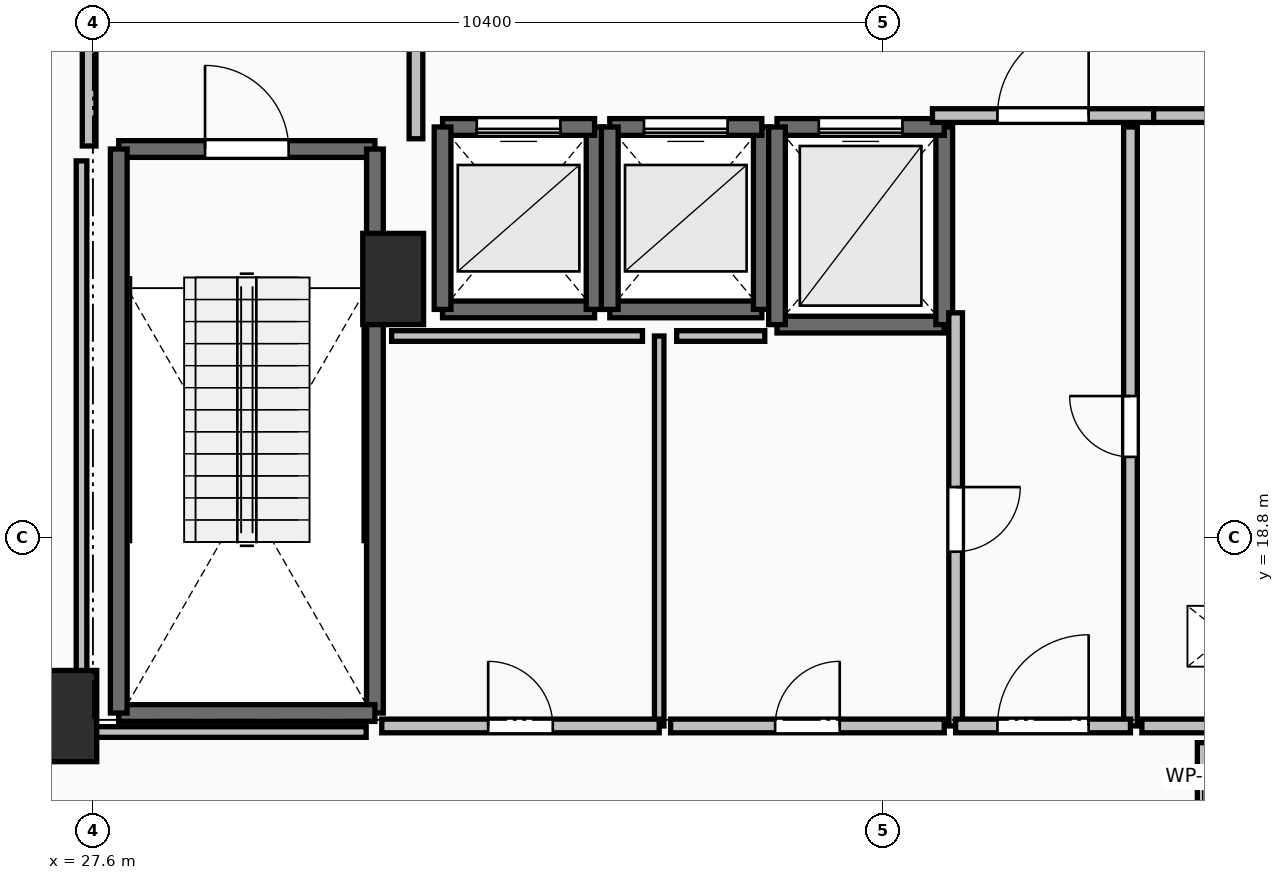
"""IFC4 building model, lengths in metres.
Left out: names, types, materials, properties, quantities, classifications, styles, units other than length and angle.
Written with IfcOpenShell. Run it as: python <this file> out.ifc"""

import sys

from ifc_helpers import new_model, si_unit, direction, frame, frame_2d, origin, origin_2d, place, context, subcontext, project, spatial, rectangle, extrude, element, fill, save


model = new_model("IFC4")
c1 = context("Model", 3, precision=1e-05, world=origin(), true_north=direction((0.0, 1.0)))
c2 = subcontext(c1, "Body", "Model", "MODEL_VIEW")
j1 = project(units=[si_unit("LENGTHUNIT", "METRE"), si_unit("PLANEANGLEUNIT", "RADIAN")], contexts=[c1])
p1 = place(None, origin())
s1 = spatial("IfcSite", under=j1, at=p1, CompositionType="ELEMENT")
p2 = place(p1, origin())
s2 = spatial("IfcBuilding", under=s1, at=p2, CompositionType="ELEMENT")
p3 = place(p2, frame((0.0, 0.0, 174.6)))
s3 = spatial("IfcBuildingStorey", under=s2, at=p3, CompositionType="ELEMENT", Elevation=174.6)
for number, where, z_axis, x_axis in (
    (1, (27.25, 16.45, 0.0), (0.0, 0.0, 1.0), (1.0, 0.0, 0.0)),
    (2, (31.55, 22.2, 0.0), (0.0, 0.0, 1.0), (1.0, 0.0, 0.0)),
):
    element("IfcColumn", number, at=place(p3, frame(where, z_axis=z_axis, x_axis=x_axis)), inside=s3, PredefinedType="PILASTER", context=c2, shape_type="SweptSolid", body=[
        extrude(rectangle(XDim=0.8, YDim=1.2, at=origin_2d()), origin(), (0.0, 0.0, 1.0), 4.5),
    ])
p4 = place(p3, frame((27.94, 23.91, 0.0), z_axis=(0.0, 0.0, 1.0), x_axis=(1.0, 0.0, 0.0)))
e3 = element("IfcWall", 3, at=p4, inside=s3, PredefinedType="SOLIDWALL", context=c2, shape_type="SweptSolid", body=[
    extrude(rectangle(XDim=3.37, YDim=0.22, at=frame_2d((1.685, 0.0))), origin(), (0.0, 0.0, 1.0), 4.24),
])
p5 = place(p4, frame((1.135, 0.0, 0.0)))
e4 = element("IfcOpeningElement", 4, at=p5, cuts=e3, PredefinedType="OPENING", context=c2, shape_type="SweptSolid", body=[
    extrude(rectangle(XDim=1.1, YDim=2.15, at=frame_2d((0.55, 1.075))), frame((0.0, 0.125, 0.0), z_axis=(0.0, -1.0, 0.0), x_axis=(1.0, 0.0, 0.0)), (0.0, 0.0, 1.0), 0.25),
])
p6 = place(p3, frame((31.31, 23.91, 0.0), z_axis=(0.0, 0.0, 1.0), x_axis=(0.0, -1.0, 0.0)))
e5 = element("IfcWall", 5, at=p6, inside=s3, PredefinedType="SOLIDWALL", context=c2, shape_type="SweptSolid", body=[
    extrude(rectangle(XDim=7.42, YDim=0.22, at=frame_2d((3.71, 0.0))), origin(), (0.0, 0.0, 1.0), 4.24),
])
p7 = place(p3, frame((31.31, 16.49, 0.0), z_axis=(0.0, 0.0, 1.0), x_axis=(-1.0, 0.0, 0.0)))
e6 = element("IfcWall", 6, at=p7, inside=s3, PredefinedType="SOLIDWALL", context=c2, shape_type="SweptSolid", body=[
    extrude(rectangle(XDim=3.37, YDim=0.22, at=frame_2d((1.685, 0.0))), origin(), (0.0, 0.0, 1.0), 4.24),
])
p8 = place(p3, frame((27.94, 16.49, 0.0), z_axis=(0.0, 0.0, 1.0), x_axis=(0.0, 1.0, 0.0)))
e7 = element("IfcWall", 7, at=p8, inside=s3, PredefinedType="SOLIDWALL", context=c2, shape_type="SweptSolid", body=[
    extrude(rectangle(XDim=7.42, YDim=0.22, at=frame_2d((3.71, 0.0))), origin(), (0.0, 0.0, 1.0), 4.24),
])
p9 = place(p3, frame((32.2, 21.8, 0.0), z_axis=(0.0, 0.0, 1.0), x_axis=(1.0, 0.0, 0.0)))
e8 = element("IfcWall", 8, at=p9, inside=s3, PredefinedType="SOLIDWALL", context=c2, shape_type="SweptSolid", body=[
    extrude(rectangle(XDim=2.0, YDim=0.22, at=frame_2d((1.0, 0.0))), origin(), (0.0, 0.0, 1.0), 4.24),
])
p10 = place(p3, frame((34.2, 21.8, 0.0), z_axis=(0.0, 0.0, 1.0), x_axis=(0.0, 1.0, 0.0)))
e9 = element("IfcWall", 9, at=p10, inside=s3, PredefinedType="SOLIDWALL", context=c2, shape_type="SweptSolid", body=[
    extrude(rectangle(XDim=2.4, YDim=0.22, at=frame_2d((1.2, 0.0))), origin(), (0.0, 0.0, 1.0), 4.24),
])
p11 = place(p3, frame((34.2, 24.2, 0.0), z_axis=(0.0, 0.0, 1.0), x_axis=(-1.0, 0.0, 0.0)))
e10 = element("IfcWall", 10, at=p11, inside=s3, PredefinedType="SOLIDWALL", context=c2, shape_type="SweptSolid", body=[
    extrude(rectangle(XDim=2.0, YDim=0.22, at=frame_2d((1.0, 0.0))), origin(), (0.0, 0.0, 1.0), 4.24),
])
p12 = place(p11, frame((0.45, 0.0, 0.0)))
e11 = element("IfcOpeningElement", 11, at=p12, cuts=e10, PredefinedType="OPENING", context=c2, shape_type="SweptSolid", body=[
    extrude(rectangle(XDim=1.1, YDim=2.2, at=frame_2d((0.55, 1.1))), frame((0.0, 0.125, 0.0), z_axis=(0.0, -1.0, 0.0), x_axis=(1.0, 0.0, 0.0)), (0.0, 0.0, 1.0), 0.25),
])
p13 = place(p3, frame((32.2, 24.2, 0.0), z_axis=(0.0, 0.0, 1.0), x_axis=(0.0, -1.0, 0.0)))
e12 = element("IfcWall", 12, at=p13, inside=s3, PredefinedType="SOLIDWALL", context=c2, shape_type="SweptSolid", body=[
    extrude(rectangle(XDim=2.4, YDim=0.22, at=frame_2d((1.2, 0.0))), origin(), (0.0, 0.0, 1.0), 4.24),
])
p14 = place(p3, frame((34.4, 21.8, 0.0), z_axis=(0.0, 0.0, 1.0), x_axis=(1.0, 0.0, 0.0)))
e13 = element("IfcWall", 13, at=p14, inside=s3, PredefinedType="SOLIDWALL", context=c2, shape_type="SweptSolid", body=[
    extrude(rectangle(XDim=2.0, YDim=0.22, at=frame_2d((1.0, 0.0))), origin(), (0.0, 0.0, 1.0), 4.24),
])
p15 = place(p3, frame((36.4, 21.8, 0.0), z_axis=(0.0, 0.0, 1.0), x_axis=(0.0, 1.0, 0.0)))
e14 = element("IfcWall", 14, at=p15, inside=s3, PredefinedType="SOLIDWALL", context=c2, shape_type="SweptSolid", body=[
    extrude(rectangle(XDim=2.4, YDim=0.22, at=frame_2d((1.2, 0.0))), origin(), (0.0, 0.0, 1.0), 4.24),
])
p16 = place(p3, frame((36.4, 24.2, 0.0), z_axis=(0.0, 0.0, 1.0), x_axis=(-1.0, 0.0, 0.0)))
e15 = element("IfcWall", 15, at=p16, inside=s3, PredefinedType="SOLIDWALL", context=c2, shape_type="SweptSolid", body=[
    extrude(rectangle(XDim=2.0, YDim=0.22, at=frame_2d((1.0, 0.0))), origin(), (0.0, 0.0, 1.0), 4.24),
])
p17 = place(p16, frame((0.45, 0.0, 0.0)))
e16 = element("IfcOpeningElement", 16, at=p17, cuts=e15, PredefinedType="OPENING", context=c2, shape_type="SweptSolid", body=[
    extrude(rectangle(XDim=1.1, YDim=2.2, at=frame_2d((0.55, 1.1))), frame((0.0, 0.125, 0.0), z_axis=(0.0, -1.0, 0.0), x_axis=(1.0, 0.0, 0.0)), (0.0, 0.0, 1.0), 0.25),
])
p18 = place(p3, frame((34.4, 24.2, 0.0), z_axis=(0.0, 0.0, 1.0), x_axis=(0.0, -1.0, 0.0)))
e17 = element("IfcWall", 17, at=p18, inside=s3, PredefinedType="SOLIDWALL", context=c2, shape_type="SweptSolid", body=[
    extrude(rectangle(XDim=2.4, YDim=0.22, at=frame_2d((1.2, 0.0))), origin(), (0.0, 0.0, 1.0), 4.24),
])
p19 = place(p3, frame((36.6, 21.6, 0.0), z_axis=(0.0, 0.0, 1.0), x_axis=(1.0, 0.0, 0.0)))
e18 = element("IfcWall", 18, at=p19, inside=s3, PredefinedType="SOLIDWALL", context=c2, shape_type="SweptSolid", body=[
    extrude(rectangle(XDim=2.2, YDim=0.22, at=frame_2d((1.1, 0.0))), origin(), (0.0, 0.0, 1.0), 4.24),
])
p20 = place(p3, frame((38.8, 21.6, 0.0), z_axis=(0.0, 0.0, 1.0), x_axis=(0.0, 1.0, 0.0)))
e19 = element("IfcWall", 19, at=p20, inside=s3, PredefinedType="SOLIDWALL", context=c2, shape_type="SweptSolid", body=[
    extrude(rectangle(XDim=2.6, YDim=0.22, at=frame_2d((1.3, 0.0))), origin(), (0.0, 0.0, 1.0), 4.24),
])
p21 = place(p3, frame((38.8, 24.2, 0.0), z_axis=(0.0, 0.0, 1.0), x_axis=(-1.0, 0.0, 0.0)))
e20 = element("IfcWall", 20, at=p21, inside=s3, PredefinedType="SOLIDWALL", context=c2, shape_type="SweptSolid", body=[
    extrude(rectangle(XDim=2.2, YDim=0.22, at=frame_2d((1.1, 0.0))), origin(), (0.0, 0.0, 1.0), 4.24),
])
p22 = place(p21, frame((0.55, 0.0, 0.0)))
e21 = element("IfcOpeningElement", 21, at=p22, cuts=e20, PredefinedType="OPENING", context=c2, shape_type="SweptSolid", body=[
    extrude(rectangle(XDim=1.1, YDim=2.2, at=frame_2d((0.55, 1.1))), frame((0.0, 0.125, 0.0), z_axis=(0.0, -1.0, 0.0), x_axis=(1.0, 0.0, 0.0)), (0.0, 0.0, 1.0), 0.25),
])
p23 = place(p3, frame((36.6, 24.2, 0.0), z_axis=(0.0, 0.0, 1.0), x_axis=(0.0, -1.0, 0.0)))
e22 = element("IfcWall", 22, at=p23, inside=s3, PredefinedType="SOLIDWALL", context=c2, shape_type="SweptSolid", body=[
    extrude(rectangle(XDim=2.6, YDim=0.22, at=frame_2d((1.3, 0.0))), origin(), (0.0, 0.0, 1.0), 4.24),
])
p24 = place(p3, frame((31.85, 24.045, 0.0), z_axis=(0.0, 0.0, 1.0), x_axis=(0.0, 1.0, 0.0)))
e23 = element("IfcWall", 23, at=p24, inside=s3, PredefinedType="PARTITIONING", context=c2, shape_type="SweptSolid", body=[
    extrude(rectangle(XDim=3.91, YDim=0.18, at=frame_2d((1.955, 0.0))), origin(), (0.0, 0.0, 1.0), 4.24),
])
p25 = place(p24, frame((1.355, 0.0, 0.0)))
e24 = element("IfcOpeningElement", 24, at=p25, cuts=e23, PredefinedType="OPENING", context=c2, shape_type="SweptSolid", body=[
    extrude(rectangle(XDim=1.2, YDim=2.15, at=frame_2d((0.6, 1.075))), frame((0.0, 0.105, 0.0), z_axis=(0.0, -1.0, 0.0), x_axis=(1.0, 0.0, 0.0)), (0.0, 0.0, 1.0), 0.21),
])
p26 = place(p3, frame((27.55, 28.0, 0.0), z_axis=(0.0, 0.0, 1.0), x_axis=(0.0, -1.0, 0.0)))
e25 = element("IfcWall", 25, at=p26, inside=s3, PredefinedType="PARTITIONING", context=c2, shape_type="SweptSolid", body=[
    extrude(rectangle(XDim=4.05, YDim=0.18, at=frame_2d((2.025, 0.0))), origin(), (0.0, 0.0, 1.0), 4.24),
])
p27 = place(p26, frame((1.425, 0.0, 0.0)))
e26 = element("IfcOpeningElement", 26, at=p27, cuts=e25, PredefinedType="OPENING", context=c2, shape_type="SweptSolid", body=[
    extrude(rectangle(XDim=1.2, YDim=2.15, at=frame_2d((0.6, 1.075))), frame((0.0, 0.105, 0.0), z_axis=(0.0, -1.0, 0.0), x_axis=(1.0, 0.0, 0.0)), (0.0, 0.0, 1.0), 0.21),
])
p28 = place(p3, frame((38.645, 24.35, 0.0), z_axis=(0.0, 0.0, 1.0), x_axis=(1.0, 0.0, 0.0)))
e27 = element("IfcWall", 27, at=p28, inside=s3, PredefinedType="PARTITIONING", context=c2, shape_type="SweptSolid", body=[
    extrude(rectangle(XDim=2.91, YDim=0.18, at=frame_2d((1.455, 0.0))), origin(), (0.0, 0.0, 1.0), 4.24),
])
p29 = place(p28, frame((0.855, 0.0, 0.0)))
e28 = element("IfcOpeningElement", 28, at=p29, cuts=e27, PredefinedType="OPENING", context=c2, shape_type="SweptSolid", body=[
    extrude(rectangle(XDim=1.2, YDim=2.15, at=frame_2d((0.6, 1.075))), frame((0.0, 0.105, 0.0), z_axis=(0.0, -1.0, 0.0), x_axis=(1.0, 0.0, 0.0)), (0.0, 0.0, 1.0), 0.21),
])
p30 = place(p3, frame((41.555, 24.35, 0.0), z_axis=(0.0, 0.0, 1.0), x_axis=(1.0, 0.0, 0.0)))
e29 = element("IfcWall", 29, at=p30, inside=s3, PredefinedType="PARTITIONING", context=c2, shape_type="SweptSolid", body=[
    extrude(rectangle(XDim=2.445, YDim=0.18, at=frame_2d((1.223, 0.0))), origin(), (0.0, 0.0, 1.0), 4.24),
])
p31 = place(p30, frame((0.823, 0.0, 0.0)))
e30 = element("IfcOpeningElement", 30, at=p31, cuts=e29, PredefinedType="OPENING", context=c2, shape_type="SweptSolid", body=[
    extrude(rectangle(XDim=0.8, YDim=2.05, at=frame_2d((0.4, 1.025))), frame((0.0, 0.105, 0.0), z_axis=(0.0, -1.0, 0.0), x_axis=(1.0, 0.0, 0.0)), (0.0, 0.0, 1.0), 0.21),
])
p32 = place(p3, frame((41.25, 16.32, 0.0), z_axis=(0.0, 0.0, 1.0), x_axis=(0.0, 1.0, 0.0)))
e31 = element("IfcWall", 31, at=p32, inside=s3, PredefinedType="PARTITIONING", context=c2, shape_type="SweptSolid", body=[
    extrude(rectangle(XDim=7.88, YDim=0.18, at=frame_2d((3.94, 0.0))), origin(), (0.0, 0.0, 1.0), 4.24),
])
p33 = place(p32, frame((3.54, 0.0, 0.0)))
e32 = element("IfcOpeningElement", 32, at=p33, cuts=e31, PredefinedType="OPENING", context=c2, shape_type="SweptSolid", body=[
    extrude(rectangle(XDim=0.8, YDim=2.05, at=frame_2d((0.4, 1.025))), frame((0.0, 0.105, 0.0), z_axis=(0.0, -1.0, 0.0), x_axis=(1.0, 0.0, 0.0)), (0.0, 0.0, 1.0), 0.21),
])
p34 = place(p3, frame((38.95, 21.755, 0.0), z_axis=(0.0, 0.0, 1.0), x_axis=(0.0, -1.0, 0.0)))
e33 = element("IfcWall", 33, at=p34, inside=s3, PredefinedType="PARTITIONING", context=c2, shape_type="SweptSolid", body=[
    extrude(rectangle(XDim=5.435, YDim=0.18, at=frame_2d((2.717, 0.0))), origin(), (0.0, 0.0, 1.0), 4.24),
])
p35 = place(p34, frame((2.292, 0.0, 0.0)))
e34 = element("IfcOpeningElement", 34, at=p35, cuts=e33, PredefinedType="OPENING", context=c2, shape_type="SweptSolid", body=[
    extrude(rectangle(XDim=0.85, YDim=2.1, at=frame_2d((0.425, 1.05))), frame((0.0, 0.105, 0.0), z_axis=(0.0, -1.0, 0.0), x_axis=(1.0, 0.0, 0.0)), (0.0, 0.0, 1.0), 0.21),
])
p36 = place(p3, frame((38.95, 16.32, 0.0), z_axis=(0.0, 0.0, 1.0), x_axis=(1.0, 0.0, 0.0)))
e35 = element("IfcWall", 35, at=p36, inside=s3, PredefinedType="PARTITIONING", context=c2, shape_type="SweptSolid", body=[
    extrude(rectangle(XDim=2.3, YDim=0.18, at=frame_2d((1.15, 0.0))), origin(), (0.0, 0.0, 1.0), 4.24),
])
p37 = place(p36, frame((0.55, 0.0, 0.0)))
e36 = element("IfcOpeningElement", 36, at=p37, cuts=e35, PredefinedType="OPENING", context=c2, shape_type="SweptSolid", body=[
    extrude(rectangle(XDim=1.2, YDim=2.15, at=frame_2d((0.6, 1.075))), frame((0.0, 0.105, 0.0), z_axis=(0.0, -1.0, 0.0), x_axis=(1.0, 0.0, 0.0)), (0.0, 0.0, 1.0), 0.21),
])
p38 = place(p3, frame((41.4, 16.32, 0.0), z_axis=(0.0, 0.0, 1.0), x_axis=(1.0, 0.0, 0.0)))
e37 = element("IfcWall", 37, at=p38, inside=s3, PredefinedType="PARTITIONING", context=c2, shape_type="SweptSolid", body=[
    extrude(rectangle(XDim=3.2, YDim=0.18, at=frame_2d((1.6, 0.0))), origin(), (0.0, 0.0, 1.0), 4.24),
])
p39 = place(p38, frame((1.2, 0.0, 0.0)))
e38 = element("IfcOpeningElement", 38, at=p39, cuts=e37, PredefinedType="OPENING", context=c2, shape_type="SweptSolid", body=[
    extrude(rectangle(XDim=0.8, YDim=2.05, at=frame_2d((0.4, 1.025))), frame((0.0, 0.105, 0.0), z_axis=(0.0, -1.0, 0.0), x_axis=(1.0, 0.0, 0.0)), (0.0, 0.0, 1.0), 0.21),
])
p40 = place(p3, frame((35.05, 16.32, 0.0), z_axis=(0.0, 0.0, 1.0), x_axis=(0.0, 1.0, 0.0)))
e39 = element("IfcWall", 39, at=p40, inside=s3, PredefinedType="PARTITIONING", context=c2, shape_type="SweptSolid", body=[
    extrude(rectangle(XDim=5.13, YDim=0.125, at=frame_2d((2.565, 0.0))), origin(), (0.0, 0.0, 1.0), 4.24),
])
p41 = place(p3, frame((31.4, 16.32, 0.0), z_axis=(0.0, 0.0, 1.0), x_axis=(1.0, 0.0, 0.0)))
e40 = element("IfcWall", 40, at=p41, inside=s3, PredefinedType="PARTITIONING", context=c2, shape_type="SweptSolid", body=[
    extrude(rectangle(XDim=3.65, YDim=0.18, at=frame_2d((1.825, 0.0))), origin(), (0.0, 0.0, 1.0), 4.24),
])
p42 = place(p41, frame((1.4, 0.0, 0.0)))
e41 = element("IfcOpeningElement", 41, at=p42, cuts=e40, PredefinedType="OPENING", context=c2, shape_type="SweptSolid", body=[
    extrude(rectangle(XDim=0.85, YDim=2.1, at=frame_2d((0.425, 1.05))), frame((0.0, 0.105, 0.0), z_axis=(0.0, -1.0, 0.0), x_axis=(1.0, 0.0, 0.0)), (0.0, 0.0, 1.0), 0.21),
])
p43 = place(p3, frame((35.2, 16.32, 0.0), z_axis=(0.0, 0.0, 1.0), x_axis=(1.0, 0.0, 0.0)))
e42 = element("IfcWall", 42, at=p43, inside=s3, PredefinedType="PARTITIONING", context=c2, shape_type="SweptSolid", body=[
    extrude(rectangle(XDim=3.6, YDim=0.18, at=frame_2d((1.8, 0.0))), origin(), (0.0, 0.0, 1.0), 4.24),
])
p44 = place(p43, frame((1.375, 0.0, 0.0)))
e43 = element("IfcOpeningElement", 43, at=p44, cuts=e42, PredefinedType="OPENING", context=c2, shape_type="SweptSolid", body=[
    extrude(rectangle(XDim=0.85, YDim=2.1, at=frame_2d((0.425, 1.05))), frame((0.0, 0.105, 0.0), z_axis=(0.0, -1.0, 0.0), x_axis=(1.0, 0.0, 0.0)), (0.0, 0.0, 1.0), 0.21),
])
p45 = place(p3, frame((34.83, 21.45, 0.0), z_axis=(0.0, 0.0, 1.0), x_axis=(-1.0, 0.0, 0.0)))
e44 = element("IfcWall", 44, at=p45, inside=s3, PredefinedType="PARTITIONING", context=c2, shape_type="SweptSolid", body=[
    extrude(rectangle(XDim=3.3, YDim=0.14, at=frame_2d((1.65, 0.0))), origin(), (0.0, 0.0, 1.0), 4.24),
])
p46 = place(p3, frame((36.439, 21.45, 0.0), z_axis=(0.0, 0.0, 1.0), x_axis=(-1.0, 0.0, 0.0)))
e45 = element("IfcWall", 45, at=p46, inside=s3, PredefinedType="PARTITIONING", context=c2, shape_type="SweptSolid", body=[
    extrude(rectangle(XDim=1.159, YDim=0.14, at=frame_2d((0.58, 0.0))), origin(), (0.0, 0.0, 1.0), 4.24),
])
p47 = place(p3, frame((27.45, 23.754, 0.0), z_axis=(0.0, 0.0, 1.0), x_axis=(0.0, -1.0, 0.0)))
e46 = element("IfcWall", 46, at=p47, inside=s3, PredefinedType="PARTITIONING", context=c2, shape_type="SweptSolid", body=[
    extrude(rectangle(XDim=7.514, YDim=0.14, at=frame_2d((3.757, 0.0))), origin(), (0.0, 0.0, 1.0), 3.432),
])
p48 = place(p3, frame((27.45, 16.24, 0.0), z_axis=(0.0, 0.0, 1.0), x_axis=(1.0, 0.0, 0.0)))
e47 = element("IfcWall", 47, at=p48, inside=s3, PredefinedType="PARTITIONING", context=c2, shape_type="SweptSolid", body=[
    extrude(rectangle(XDim=3.745, YDim=0.14, at=frame_2d((1.873, 0.0))), origin(), (0.0, 0.0, 1.0), 3.432),
])
p49 = place(p3, frame((42.2, 16.1, 0.0), z_axis=(0.0, 0.0, 1.0), x_axis=(0.0, -1.0, 0.0)))
e48 = element("IfcWall", 48, at=p49, inside=s3, PredefinedType="PARTITIONING", context=c2, shape_type="SweptSolid", body=[
    extrude(rectangle(XDim=1.83, YDim=0.14, at=frame_2d((0.915, 0.0))), origin(), (0.0, 0.0, 1.0), 3.929),
])
p50 = place(p5, origin())
e49 = element("IfcDoor", 49, at=p50, inside=s3, OperationType="SINGLE_SWING_LEFT", PredefinedType="DOOR", context=c2, shape_type="SweptSolid", body=[
    extrude(rectangle(XDim=1.1, YDim=2.15, at=frame_2d((0.55, 1.075))), frame((0.0, 0.025, 0.0), z_axis=(0.0, -1.0, 0.0), x_axis=(1.0, 0.0, 0.0)), (0.0, 0.0, 1.0), 0.05),
])
fill(e4, e49)
p51 = place(p12, origin())
e50 = element("IfcDoor", 50, at=p51, inside=s3, OperationType="SLIDING_TO_LEFT", PredefinedType="DOOR", context=c2, shape_type="SweptSolid", body=[
    extrude(rectangle(XDim=1.1, YDim=2.2, at=frame_2d((0.55, 1.1))), frame((0.0, 0.025, 0.0), z_axis=(0.0, -1.0, 0.0), x_axis=(1.0, 0.0, 0.0)), (0.0, 0.0, 1.0), 0.05),
])
fill(e11, e50)
p52 = place(p17, origin())
e51 = element("IfcDoor", 51, at=p52, inside=s3, OperationType="SLIDING_TO_LEFT", PredefinedType="DOOR", context=c2, shape_type="SweptSolid", body=[
    extrude(rectangle(XDim=1.1, YDim=2.2, at=frame_2d((0.55, 1.1))), frame((0.0, 0.025, 0.0), z_axis=(0.0, -1.0, 0.0), x_axis=(1.0, 0.0, 0.0)), (0.0, 0.0, 1.0), 0.05),
])
fill(e16, e51)
p53 = place(p22, origin())
e52 = element("IfcDoor", 52, at=p53, inside=s3, OperationType="SLIDING_TO_LEFT", PredefinedType="DOOR", context=c2, shape_type="SweptSolid", body=[
    extrude(rectangle(XDim=1.1, YDim=2.2, at=frame_2d((0.55, 1.1))), frame((0.0, 0.025, 0.0), z_axis=(0.0, -1.0, 0.0), x_axis=(1.0, 0.0, 0.0)), (0.0, 0.0, 1.0), 0.05),
])
fill(e21, e52)
p54 = place(p29, origin())
e53 = element("IfcDoor", 53, at=p54, inside=s3, OperationType="SINGLE_SWING_RIGHT", PredefinedType="DOOR", context=c2, shape_type="SweptSolid", body=[
    extrude(rectangle(XDim=1.2, YDim=2.15, at=frame_2d((0.6, 1.075))), frame((0.0, 0.025, 0.0), z_axis=(0.0, -1.0, 0.0), x_axis=(1.0, 0.0, 0.0)), (0.0, 0.0, 1.0), 0.05),
])
fill(e28, e53)
p55 = place(p33, origin())
e54 = element("IfcDoor", 54, at=p55, inside=s3, OperationType="SINGLE_SWING_RIGHT", PredefinedType="DOOR", context=c2, shape_type="SweptSolid", body=[
    extrude(rectangle(XDim=0.8, YDim=2.05, at=frame_2d((0.4, 1.025))), frame((0.0, 0.025, 0.0), z_axis=(0.0, -1.0, 0.0), x_axis=(1.0, 0.0, 0.0)), (0.0, 0.0, 1.0), 0.05),
])
fill(e32, e54)
p56 = place(p35, origin())
e55 = element("IfcDoor", 55, at=p56, inside=s3, OperationType="SINGLE_SWING_LEFT", PredefinedType="DOOR", context=c2, shape_type="SweptSolid", body=[
    extrude(rectangle(XDim=0.85, YDim=2.1, at=frame_2d((0.425, 1.05))), frame((0.0, 0.025, 0.0), z_axis=(0.0, -1.0, 0.0), x_axis=(1.0, 0.0, 0.0)), (0.0, 0.0, 1.0), 0.05),
])
fill(e34, e55)
p57 = place(p37, origin())
e56 = element("IfcDoor", 56, at=p57, inside=s3, OperationType="SINGLE_SWING_RIGHT", PredefinedType="DOOR", context=c2, shape_type="SweptSolid", body=[
    extrude(rectangle(XDim=1.2, YDim=2.15, at=frame_2d((0.6, 1.075))), frame((0.0, 0.025, 0.0), z_axis=(0.0, -1.0, 0.0), x_axis=(1.0, 0.0, 0.0)), (0.0, 0.0, 1.0), 0.05),
])
fill(e36, e56)
p58 = place(p42, origin())
e57 = element("IfcDoor", 57, at=p58, inside=s3, OperationType="SINGLE_SWING_LEFT", PredefinedType="DOOR", context=c2, shape_type="SweptSolid", body=[
    extrude(rectangle(XDim=0.85, YDim=2.1, at=frame_2d((0.425, 1.05))), frame((0.0, 0.025, 0.0), z_axis=(0.0, -1.0, 0.0), x_axis=(1.0, 0.0, 0.0)), (0.0, 0.0, 1.0), 0.05),
])
fill(e41, e57)
p59 = place(p44, origin())
e58 = element("IfcDoor", 58, at=p59, inside=s3, OperationType="SINGLE_SWING_RIGHT", PredefinedType="DOOR", context=c2, shape_type="SweptSolid", body=[
    extrude(rectangle(XDim=0.85, YDim=2.1, at=frame_2d((0.425, 1.05))), frame((0.0, 0.025, 0.0), z_axis=(0.0, -1.0, 0.0), x_axis=(1.0, 0.0, 0.0)), (0.0, 0.0, 1.0), 0.05),
])
fill(e43, e58)
save(model, sys.argv[1])
